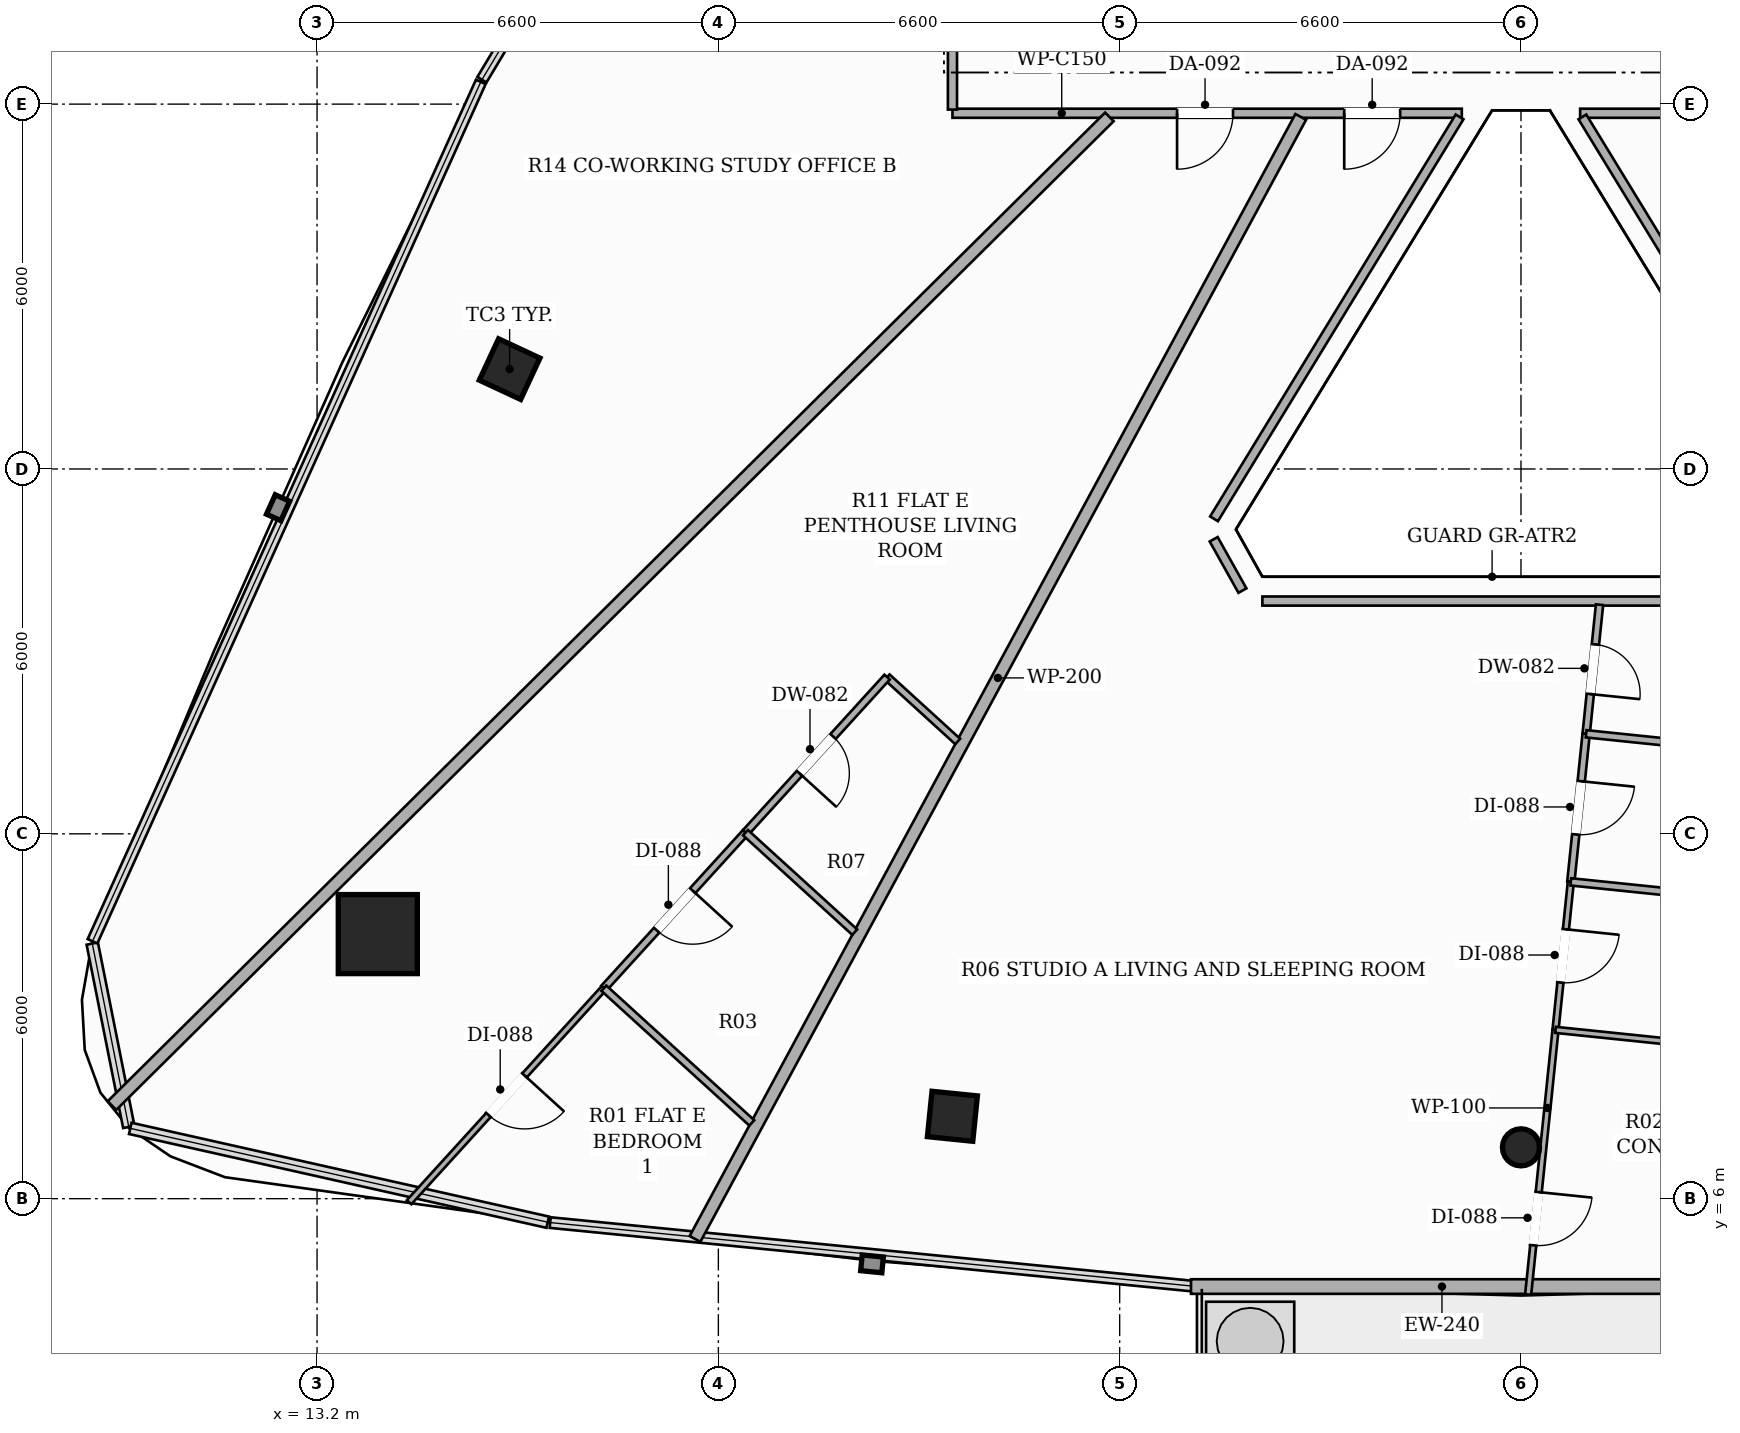
"""IFC4 building model, lengths in metres.
Left out: names, types, materials, properties, quantities, classifications, styles, units other than length and angle.
Written with IfcOpenShell. Run it as: python <this file> out.ifc"""

import sys

from ifc_helpers import new_model, si_unit, direction, frame, frame_2d, origin, origin_2d, place, context, subcontext, project, spatial, rectangle, hollow_rectangle, hollow_circle, extrude, element, fill, save


model = new_model("IFC4")
c1 = context("Model", 3, precision=1e-05, world=origin(), true_north=direction((0.0, 1.0)))
c2 = subcontext(c1, "Body", "Model", "MODEL_VIEW")
j1 = project(units=[si_unit("LENGTHUNIT", "METRE"), si_unit("PLANEANGLEUNIT", "RADIAN")], contexts=[c1])
p1 = place(None, origin())
s1 = spatial("IfcSite", under=j1, at=p1, CompositionType="ELEMENT")
p2 = place(p1, origin())
s2 = spatial("IfcBuilding", under=s1, at=p2, CompositionType="ELEMENT")
p3 = place(p2, frame((0.0, 0.0, 199.7)))
s3 = spatial("IfcBuildingStorey", under=s2, at=p3, CompositionType="ELEMENT", Elevation=199.7)
p4 = place(p3, frame((14.199, 10.351, 0.0), z_axis=(0.0, 0.0, 1.0), x_axis=(1.0, 0.0, 0.0)))
e1 = element("IfcColumn", 1, at=p4, inside=s3, PredefinedType="COLUMN", context=c2, shape_type="SweptSolid", body=[
    extrude(hollow_rectangle(XDim=1.3, YDim=1.3, WallThickness=0.04, at=origin_2d()), origin(), (0.0, 0.0, 1.0), 3.3),
])
for number, where, z_axis, x_axis in (
    (2, (16.367, 19.642, 0.0), (0.0, 0.0, 1.0), (0.423, 0.906, 0.0)),
    (3, (23.649, 7.355, 0.0), (0.0, 0.0, 1.0), (-0.995, 0.101, 0.0)),
):
    element("IfcColumn", number, at=place(p3, frame(where, z_axis=z_axis, x_axis=x_axis)), inside=s3, PredefinedType="COLUMN", context=c2, shape_type="SweptSolid", body=[
        extrude(hollow_rectangle(XDim=0.75, YDim=0.75, WallThickness=0.025, at=origin_2d()), origin(), (0.0, 0.0, 1.0), 3.3),
    ])
p5 = place(p3, frame((33.0, 6.844, 0.0), z_axis=(0.0, 0.0, 1.0), x_axis=(1.0, 0.0, 0.0)))
e4 = element("IfcColumn", 4, at=p5, inside=s3, PredefinedType="COLUMN", context=c2, shape_type="SweptSolid", body=[
    extrude(hollow_circle(Radius=0.305, WallThickness=0.016, at=origin_2d()), origin(), (0.0, 0.0, 1.0), 3.3),
])
p6 = place(p3, frame((27.573, 4.555, 0.0), z_axis=(0.0, 0.0, 1.0), x_axis=(1.0, 0.0, 0.0)))
e5 = element("IfcWall", 5, at=p6, inside=s3, PredefinedType="SOLIDWALL", context=c2, shape_type="SweptSolid", body=[
    extrude(rectangle(XDim=10.854, YDim=0.24, at=frame_2d((5.427, 0.0))), origin(), (0.0, 0.0, 1.0), 2.624),
])
p7 = place(p6, frame((8.355, 0.0, 0.0)))
e6 = element("IfcOpeningElement", 6, at=p7, cuts=e5, PredefinedType="OPENING", context=c2, shape_type="SweptSolid", body=[
    extrude(rectangle(XDim=1.8, YDim=2.2, at=frame_2d((0.9, 1.1))), frame((0.0, 0.13, 0.0), z_axis=(0.0, -1.0, 0.0), x_axis=(1.0, 0.0, 0.0)), (0.0, 0.0, 1.0), 0.26),
])
p8 = place(p3, frame((32.027, 23.85, 0.0), z_axis=(0.0, 0.0, 1.0), x_axis=(-1.0, 0.0, 0.0)))
e7 = element("IfcWall", 7, at=p8, inside=s3, PredefinedType="PARTITIONING", context=c2, shape_type="SweptSolid", body=[
    extrude(rectangle(XDim=8.377, YDim=0.15, at=frame_2d((4.188, 0.0))), origin(), (0.0, 0.0, 1.0), 2.565),
])
p9 = place(p8, frame((1.014, 0.0, 0.0)))
e8 = element("IfcOpeningElement", 8, at=p9, cuts=e7, PredefinedType="OPENING", context=c2, shape_type="SweptSolid", body=[
    extrude(rectangle(XDim=0.92, YDim=2.15, at=frame_2d((0.46, 1.075))), frame((0.0, 0.085, 0.0), z_axis=(0.0, -1.0, 0.0), x_axis=(1.0, 0.0, 0.0)), (0.0, 0.0, 1.0), 0.17),
])
p10 = place(p8, frame((3.763, 0.0, 0.0)))
e9 = element("IfcOpeningElement", 9, at=p10, cuts=e7, PredefinedType="OPENING", context=c2, shape_type="SweptSolid", body=[
    extrude(rectangle(XDim=0.92, YDim=2.15, at=frame_2d((0.46, 1.075))), frame((0.0, 0.085, 0.0), z_axis=(0.0, -1.0, 0.0), x_axis=(1.0, 0.0, 0.0)), (0.0, 0.0, 1.0), 0.17),
])
p11 = place(p3, frame((23.65, 23.91, 0.0), z_axis=(0.0, 0.0, 1.0), x_axis=(0.0, 1.0, 0.0)))
e10 = element("IfcWall", 10, at=p11, inside=s3, PredefinedType="PARTITIONING", context=c2, shape_type="SweptSolid", body=[
    extrude(rectangle(XDim=12.715, YDim=0.15, at=frame_2d((6.357, 0.0))), origin(), (0.0, 0.0, 1.0), 2.492),
])
p12 = place(p11, frame((5.917, 0.0, 0.0)))
e11 = element("IfcOpeningElement", 11, at=p12, cuts=e10, PredefinedType="OPENING", context=c2, shape_type="SweptSolid", body=[
    extrude(rectangle(XDim=0.88, YDim=2.1, at=frame_2d((0.44, 1.05))), frame((0.0, 0.085, 0.0), z_axis=(0.0, -1.0, 0.0), x_axis=(1.0, 0.0, 0.0)), (0.0, 0.0, 1.0), 0.17),
])
p13 = place(p3, frame((42.19, 23.85, 0.0), z_axis=(0.0, 0.0, 1.0), x_axis=(-1.0, 0.0, 0.0)))
e12 = element("IfcWall", 12, at=p13, inside=s3, PredefinedType="PARTITIONING", context=c2, shape_type="SweptSolid", body=[
    extrude(rectangle(XDim=8.217, YDim=0.15, at=frame_2d((4.108, 0.0))), origin(), (0.0, 0.0, 1.0), 2.565),
])
p14 = place(p13, frame((1.67, 0.0, 0.0)))
e13 = element("IfcOpeningElement", 13, at=p14, cuts=e12, PredefinedType="OPENING", context=c2, shape_type="SweptSolid", body=[
    extrude(rectangle(XDim=0.92, YDim=2.15, at=frame_2d((0.46, 1.075))), frame((0.0, 0.085, 0.0), z_axis=(0.0, -1.0, 0.0), x_axis=(1.0, 0.0, 0.0)), (0.0, 0.0, 1.0), 0.17),
])
p15 = place(p13, frame((5.12, 0.0, 0.0)))
e14 = element("IfcOpeningElement", 14, at=p15, cuts=e12, PredefinedType="OPENING", context=c2, shape_type="SweptSolid", body=[
    extrude(rectangle(XDim=0.88, YDim=2.1, at=frame_2d((0.44, 1.05))), frame((0.0, 0.085, 0.0), z_axis=(0.0, -1.0, 0.0), x_axis=(1.0, 0.0, 0.0)), (0.0, 0.0, 1.0), 0.17),
])
p16 = place(p3, frame((34.01, 23.79, 0.0), z_axis=(0.0, 0.0, 1.0), x_axis=(0.521316137909, -0.853363629618, 0.0)))
e15 = element("IfcWall", 15, at=p16, inside=s3, PredefinedType="PARTITIONING", context=c2, shape_type="SweptSolid", body=[
    extrude(rectangle(XDim=7.746, YDim=0.15, at=frame_2d((3.873, 0.0))), origin(), (0.0, 0.0, 1.0), 2.773),
])
p17 = place(p3, frame((37.253, 15.828, 0.0), z_axis=(0.0, 0.0, 1.0), x_axis=(-1.0, 0.0, 0.0)))
e16 = element("IfcWall", 16, at=p17, inside=s3, PredefinedType="PARTITIONING", context=c2, shape_type="SweptSolid", body=[
    extrude(rectangle(XDim=8.506, YDim=0.15, at=frame_2d((4.253, 0.0))), origin(), (0.0, 0.0, 1.0), 2.773),
])
p18 = place(p3, frame((28.419, 16.0, 0.0), z_axis=(0.0, 0.0, 1.0), x_axis=(-0.488810833005, 0.872389803664, 0.0)))
e17 = element("IfcWall", 17, at=p18, inside=s3, PredefinedType="PARTITIONING", context=c2, shape_type="SweptSolid", body=[
    extrude(rectangle(XDim=0.968, YDim=0.15, at=frame_2d((0.484, 0.0))), origin(), (0.0, 0.0, 1.0), 3.06),
])
p19 = place(p3, frame((27.952, 17.18, 0.0), z_axis=(0.0, 0.0, 1.0), x_axis=(0.521316137909, 0.853363629618, 0.0)))
e18 = element("IfcWall", 18, at=p19, inside=s3, PredefinedType="PARTITIONING", context=c2, shape_type="SweptSolid", body=[
    extrude(rectangle(XDim=7.746, YDim=0.15, at=frame_2d((3.873, 0.0))), origin(), (0.0, 0.0, 1.0), 2.773),
])
p20 = place(p3, frame((19.416, 5.338, 0.0), z_axis=(0.0, 0.0, 1.0), x_axis=(0.475065982754, 0.879950175879, 0.0)))
e19 = element("IfcWall", 19, at=p20, inside=s3, PredefinedType="PARTITIONING", context=c2, shape_type="SweptSolid", body=[
    extrude(rectangle(XDim=20.969, YDim=0.2, at=frame_2d((10.485, 0.0))), origin(), (0.0, 0.0, 1.0), 2.492),
])
p21 = place(p3, frame((26.231, 23.79, 0.0), z_axis=(0.0, 0.0, 1.0), x_axis=(-0.710239236144, -0.703960387693, 0.0)))
e20 = element("IfcWall", 20, at=p21, inside=s3, PredefinedType="PARTITIONING", context=c2, shape_type="SweptSolid", body=[
    extrude(rectangle(XDim=23.096, YDim=0.2, at=frame_2d((11.548, 0.0))), origin(), (0.0, 0.0, 1.0), 2.492),
])
p22 = place(p3, frame((34.292, 15.768, 0.0), z_axis=(0.0, 0.0, 1.0), x_axis=(-0.103059151492, -0.994675229054, 0.0)))
e21 = element("IfcWall", 21, at=p22, inside=s3, PredefinedType="PARTITIONING", context=c2, shape_type="SweptSolid", body=[
    extrude(rectangle(XDim=2.135, YDim=0.12, at=frame_2d((1.067, 0.0))), origin(), (0.0, 0.0, 1.0), 3.06),
])
p23 = place(p22, frame((0.657, 0.0, 0.0)))
e22 = element("IfcOpeningElement", 22, at=p23, cuts=e21, PredefinedType="OPENING", context=c2, shape_type="SweptSolid", body=[
    extrude(rectangle(XDim=0.82, YDim=2.1, at=frame_2d((0.41, 1.05))), frame((0.0, 0.07, 0.0), z_axis=(0.0, -1.0, 0.0), x_axis=(1.0, 0.0, 0.0)), (0.0, 0.0, 1.0), 0.14),
])
p24 = place(p3, frame((34.072, 13.645, 0.0), z_axis=(0.0, 0.0, 1.0), x_axis=(-0.102919566026, -0.994689681724, 0.0)))
e23 = element("IfcWall", 23, at=p24, inside=s3, PredefinedType="PARTITIONING", context=c2, shape_type="SweptSolid", body=[
    extrude(rectangle(XDim=2.448, YDim=0.12, at=frame_2d((1.224, 0.0))), origin(), (0.0, 0.0, 1.0), 3.06),
])
p25 = place(p24, frame((0.784, 0.0, 0.0)))
e24 = element("IfcOpeningElement", 24, at=p25, cuts=e23, PredefinedType="OPENING", context=c2, shape_type="SweptSolid", body=[
    extrude(rectangle(XDim=0.88, YDim=2.1, at=frame_2d((0.44, 1.05))), frame((0.0, 0.07, 0.0), z_axis=(0.0, -1.0, 0.0), x_axis=(1.0, 0.0, 0.0)), (0.0, 0.0, 1.0), 0.14),
])
p26 = place(p3, frame((33.568, 8.776, 0.0), z_axis=(0.0, 0.0, 1.0), x_axis=(-0.1029239069, -0.994689232569, 0.0)))
e25 = element("IfcWall", 25, at=p26, inside=s3, PredefinedType="PARTITIONING", context=c2, shape_type="SweptSolid", body=[
    extrude(rectangle(XDim=4.374, YDim=0.1, at=frame_2d((2.187, 0.0))), origin(), (0.0, 0.0, 1.0), 2.492),
])
p27 = place(p26, frame((2.682, 0.0, 0.0)))
e26 = element("IfcOpeningElement", 26, at=p27, cuts=e25, PredefinedType="OPENING", context=c2, shape_type="SweptSolid", body=[
    extrude(rectangle(XDim=0.88, YDim=2.1, at=frame_2d((0.44, 1.05))), frame((0.0, 0.06, 0.0), z_axis=(0.0, -1.0, 0.0), x_axis=(1.0, 0.0, 0.0)), (0.0, 0.0, 1.0), 0.12),
])
p28 = place(p3, frame((33.82, 11.21, 0.0), z_axis=(0.0, 0.0, 1.0), x_axis=(-0.102960420087, -0.994685453747, 0.0)))
e27 = element("IfcWall", 27, at=p28, inside=s3, PredefinedType="PARTITIONING", context=c2, shape_type="SweptSolid", body=[
    extrude(rectangle(XDim=2.447, YDim=0.1, at=frame_2d((1.224, 0.0))), origin(), (0.0, 0.0, 1.0), 3.06),
])
p29 = place(p28, frame((0.784, 0.0, 0.0)))
e28 = element("IfcOpeningElement", 28, at=p29, cuts=e27, PredefinedType="OPENING", context=c2, shape_type="SweptSolid", body=[
    extrude(rectangle(XDim=0.88, YDim=2.1, at=frame_2d((0.44, 1.05))), frame((0.0, 0.06, 0.0), z_axis=(0.0, -1.0, 0.0), x_axis=(1.0, 0.0, 0.0)), (0.0, 0.0, 1.0), 0.12),
])
p30 = place(p3, frame((38.025, 13.236, 0.0), z_axis=(0.0, 0.0, 1.0), x_axis=(-0.99469136016, 0.102903343108, 0.0)))
e29 = element("IfcWall", 29, at=p30, inside=s3, PredefinedType="PARTITIONING", context=c2, shape_type="SweptSolid", body=[
    extrude(rectangle(XDim=3.974, YDim=0.12, at=frame_2d((1.987, 0.0))), origin(), (0.0, 0.0, 1.0), 2.773),
])
p31 = place(p3, frame((38.777, 10.698, 0.0), z_axis=(0.0, 0.0, 1.0), x_axis=(-0.994708898019, 0.102733676081, 0.0)))
e30 = element("IfcWall", 30, at=p31, inside=s3, PredefinedType="PARTITIONING", context=c2, shape_type="SweptSolid", body=[
    extrude(rectangle(XDim=4.983, YDim=0.12, at=frame_2d((2.492, 0.0))), origin(), (0.0, 0.0, 1.0), 2.773),
])
p32 = place(p3, frame((33.568, 8.776, 0.0), z_axis=(0.0, 0.0, 1.0), x_axis=(0.994686760155, -0.102947798284, 0.0)))
e31 = element("IfcWall", 31, at=p32, inside=s3, PredefinedType="PARTITIONING", context=c2, shape_type="SweptSolid", body=[
    extrude(rectangle(XDim=5.993, YDim=0.1, at=frame_2d((2.996, 0.0))), origin(), (0.0, 0.0, 1.0), 2.773),
])
p33 = place(p3, frame((23.736, 13.519, 0.0), z_axis=(0.0, 0.0, 1.0), x_axis=(-0.739215251716, 0.673469235846, 0.0)))
e32 = element("IfcWall", 32, at=p33, inside=s3, PredefinedType="PARTITIONING", context=c2, shape_type="SweptSolid", body=[
    extrude(rectangle(XDim=1.571, YDim=0.12, at=frame_2d((0.785, 0.0))), origin(), (0.0, 0.0, 1.0), 3.06),
])
p34 = place(p3, frame((22.575, 14.577, 0.0), z_axis=(0.0, 0.0, 1.0), x_axis=(-0.673231148277, -0.739432093563, 0.0)))
e33 = element("IfcWall", 33, at=p34, inside=s3, PredefinedType="PARTITIONING", context=c2, shape_type="SweptSolid", body=[
    extrude(rectangle(XDim=3.459, YDim=0.12, at=frame_2d((1.729, 0.0))), origin(), (0.0, 0.0, 1.0), 2.773),
])
p35 = place(p34, frame((1.32, 0.0, 0.0)))
e34 = element("IfcOpeningElement", 34, at=p35, cuts=e33, PredefinedType="OPENING", context=c2, shape_type="SweptSolid", body=[
    extrude(rectangle(XDim=0.82, YDim=2.1, at=frame_2d((0.41, 1.05))), frame((0.0, 0.07, 0.0), z_axis=(0.0, -1.0, 0.0), x_axis=(1.0, 0.0, 0.0)), (0.0, 0.0, 1.0), 0.14),
])
p36 = place(p3, frame((20.246, 12.019, 0.0), z_axis=(0.0, 0.0, 1.0), x_axis=(-0.673234602732, -0.739428948368, 0.0)))
e35 = element("IfcWall", 35, at=p36, inside=s3, PredefinedType="PARTITIONING", context=c2, shape_type="SweptSolid", body=[
    extrude(rectangle(XDim=3.459, YDim=0.12, at=frame_2d((1.73, 0.0))), origin(), (0.0, 0.0, 1.0), 2.492),
])
p37 = place(p36, frame((1.29, 0.0, 0.0)))
e36 = element("IfcOpeningElement", 36, at=p37, cuts=e35, PredefinedType="OPENING", context=c2, shape_type="SweptSolid", body=[
    extrude(rectangle(XDim=0.88, YDim=2.1, at=frame_2d((0.44, 1.05))), frame((0.0, 0.07, 0.0), z_axis=(0.0, -1.0, 0.0), x_axis=(1.0, 0.0, 0.0)), (0.0, 0.0, 1.0), 0.14),
])
p38 = place(p3, frame((17.917, 9.461, 0.0), z_axis=(0.0, 0.0, 1.0), x_axis=(-0.673104266943, -0.739547595374, 0.0)))
e37 = element("IfcWall", 37, at=p38, inside=s3, PredefinedType="PARTITIONING", context=c2, shape_type="SweptSolid", body=[
    extrude(rectangle(XDim=4.758, YDim=0.1, at=frame_2d((2.379, 0.0))), origin(), (0.0, 0.0, 1.0), 2.492),
])
p39 = place(p38, frame((1.939, 0.0, 0.0)))
e38 = element("IfcOpeningElement", 38, at=p39, cuts=e37, PredefinedType="OPENING", context=c2, shape_type="SweptSolid", body=[
    extrude(rectangle(XDim=0.88, YDim=2.1, at=frame_2d((0.44, 1.05))), frame((0.0, 0.06, 0.0), z_axis=(0.0, -1.0, 0.0), x_axis=(1.0, 0.0, 0.0)), (0.0, 0.0, 1.0), 0.12),
])
p40 = place(p3, frame((22.043, 10.383, 0.0), z_axis=(0.0, 0.0, 1.0), x_axis=(-0.739435258465, 0.673227672143, 0.0)))
e39 = element("IfcWall", 39, at=p40, inside=s3, PredefinedType="PARTITIONING", context=c2, shape_type="SweptSolid", body=[
    extrude(rectangle(XDim=2.43, YDim=0.12, at=frame_2d((1.215, 0.0))), origin(), (0.0, 0.0, 1.0), 2.773),
])
p41 = place(p3, frame((20.35, 7.246, 0.0), z_axis=(0.0, 0.0, 1.0), x_axis=(-0.739496715577, 0.673160164932, 0.0)))
e40 = element("IfcWall", 40, at=p41, inside=s3, PredefinedType="PARTITIONING", context=c2, shape_type="SweptSolid", body=[
    extrude(rectangle(XDim=3.29, YDim=0.12, at=frame_2d((1.645, 0.0))), origin(), (0.0, 0.0, 1.0), 2.492),
])
p42 = place(p9, origin())
e41 = element("IfcDoor", 41, at=p42, inside=s3, OperationType="SINGLE_SWING_RIGHT", PredefinedType="DOOR", context=c2, shape_type="SweptSolid", body=[
    extrude(rectangle(XDim=0.92, YDim=2.15, at=frame_2d((0.46, 1.075))), frame((0.0, 0.025, 0.0), z_axis=(0.0, -1.0, 0.0), x_axis=(1.0, 0.0, 0.0)), (0.0, 0.0, 1.0), 0.05),
])
fill(e8, e41)
p43 = place(p23, origin())
e42 = element("IfcDoor", 42, at=p43, inside=s3, OperationType="SINGLE_SWING_RIGHT", PredefinedType="DOOR", context=c2, shape_type="SweptSolid", body=[
    extrude(rectangle(XDim=0.82, YDim=2.1, at=frame_2d((0.41, 1.05))), frame((0.0, 0.025, 0.0), z_axis=(0.0, -1.0, 0.0), x_axis=(1.0, 0.0, 0.0)), (0.0, 0.0, 1.0), 0.05),
])
fill(e22, e42)
p44 = place(p25, origin())
e43 = element("IfcDoor", 43, at=p44, inside=s3, OperationType="SINGLE_SWING_LEFT", PredefinedType="DOOR", context=c2, shape_type="SweptSolid", body=[
    extrude(rectangle(XDim=0.88, YDim=2.1, at=frame_2d((0.44, 1.05))), frame((0.0, 0.025, 0.0), z_axis=(0.0, -1.0, 0.0), x_axis=(1.0, 0.0, 0.0)), (0.0, 0.0, 1.0), 0.05),
])
fill(e24, e43)
p45 = place(p27, origin())
e44 = element("IfcDoor", 44, at=p45, inside=s3, OperationType="SINGLE_SWING_LEFT", PredefinedType="DOOR", context=c2, shape_type="SweptSolid", body=[
    extrude(rectangle(XDim=0.88, YDim=2.1, at=frame_2d((0.44, 1.05))), frame((0.0, 0.025, 0.0), z_axis=(0.0, -1.0, 0.0), x_axis=(1.0, 0.0, 0.0)), (0.0, 0.0, 1.0), 0.05),
])
fill(e26, e44)
p46 = place(p29, origin())
e45 = element("IfcDoor", 45, at=p46, inside=s3, OperationType="SINGLE_SWING_LEFT", PredefinedType="DOOR", context=c2, shape_type="SweptSolid", body=[
    extrude(rectangle(XDim=0.88, YDim=2.1, at=frame_2d((0.44, 1.05))), frame((0.0, 0.025, 0.0), z_axis=(0.0, -1.0, 0.0), x_axis=(1.0, 0.0, 0.0)), (0.0, 0.0, 1.0), 0.05),
])
fill(e28, e45)
p47 = place(p10, origin())
e46 = element("IfcDoor", 46, at=p47, inside=s3, OperationType="SINGLE_SWING_RIGHT", PredefinedType="DOOR", context=c2, shape_type="SweptSolid", body=[
    extrude(rectangle(XDim=0.92, YDim=2.15, at=frame_2d((0.46, 1.075))), frame((0.0, 0.025, 0.0), z_axis=(0.0, -1.0, 0.0), x_axis=(1.0, 0.0, 0.0)), (0.0, 0.0, 1.0), 0.05),
])
fill(e9, e46)
p48 = place(p35, origin())
e47 = element("IfcDoor", 47, at=p48, inside=s3, OperationType="SINGLE_SWING_RIGHT", PredefinedType="DOOR", context=c2, shape_type="SweptSolid", body=[
    extrude(rectangle(XDim=0.82, YDim=2.1, at=frame_2d((0.41, 1.05))), frame((0.0, 0.025, 0.0), z_axis=(0.0, -1.0, 0.0), x_axis=(1.0, 0.0, 0.0)), (0.0, 0.0, 1.0), 0.05),
])
fill(e34, e47)
p49 = place(p37, origin())
e48 = element("IfcDoor", 48, at=p49, inside=s3, OperationType="SINGLE_SWING_LEFT", PredefinedType="DOOR", context=c2, shape_type="SweptSolid", body=[
    extrude(rectangle(XDim=0.88, YDim=2.1, at=frame_2d((0.44, 1.05))), frame((0.0, 0.025, 0.0), z_axis=(0.0, -1.0, 0.0), x_axis=(1.0, 0.0, 0.0)), (0.0, 0.0, 1.0), 0.05),
])
fill(e36, e48)
p50 = place(p39, origin())
e49 = element("IfcDoor", 49, at=p50, inside=s3, OperationType="SINGLE_SWING_LEFT", PredefinedType="DOOR", context=c2, shape_type="SweptSolid", body=[
    extrude(rectangle(XDim=0.88, YDim=2.1, at=frame_2d((0.44, 1.05))), frame((0.0, 0.025, 0.0), z_axis=(0.0, -1.0, 0.0), x_axis=(1.0, 0.0, 0.0)), (0.0, 0.0, 1.0), 0.05),
])
fill(e38, e49)
save(model, sys.argv[1])
